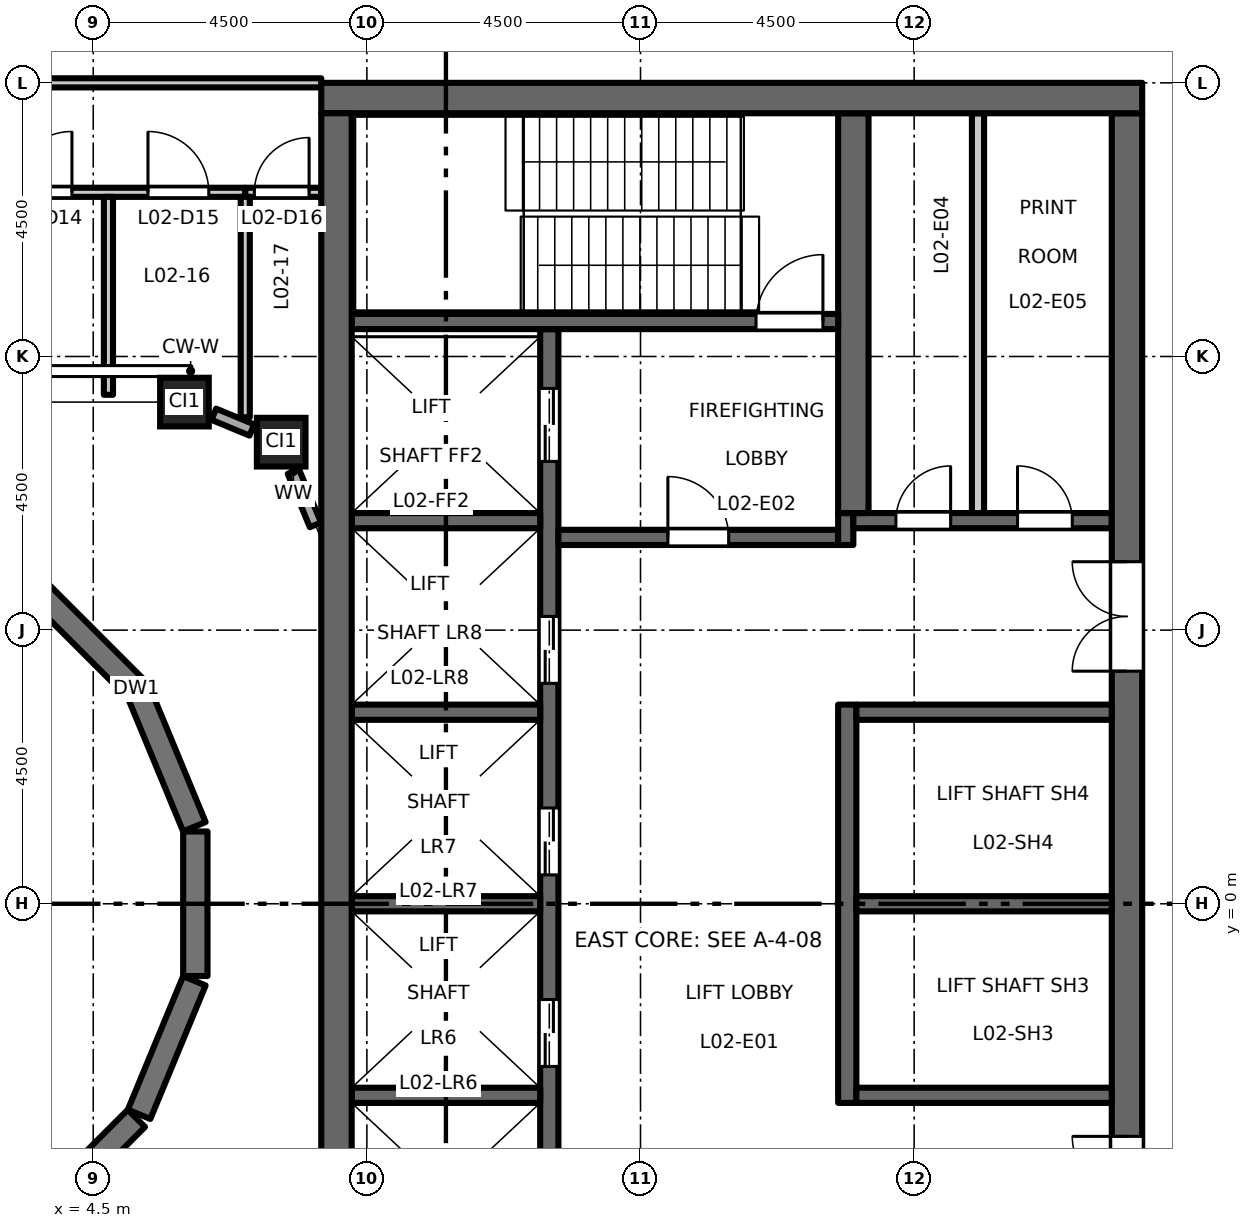
"""IFC4 building model, lengths in metres.
Left out: names, types, materials, properties, quantities, classifications, styles, units other than length and angle.
Written with IfcOpenShell. Run it as: python <this file> out.ifc"""

import sys

from ifc_helpers import new_model, si_unit, direction, frame, frame_2d, origin, origin_2d, place, context, subcontext, project, spatial, rectangle, hollow_rectangle, extrude, element, fill, save


model = new_model("IFC4")
c1 = context("Model", 3, precision=1e-05, world=origin(), true_north=direction((0.0, 1.0)))
c2 = subcontext(c1, "Body", "Model", "MODEL_VIEW")
j1 = project(units=[si_unit("LENGTHUNIT", "METRE"), si_unit("PLANEANGLEUNIT", "RADIAN")], contexts=[c1])
p1 = place(None, origin())
s1 = spatial("IfcSite", under=j1, at=p1, CompositionType="ELEMENT")
p2 = place(p1, origin())
s2 = spatial("IfcBuilding", under=s1, at=p2, CompositionType="ELEMENT")
p3 = place(p2, frame((0.0, 0.0, 12.2)))
s3 = spatial("IfcBuildingStorey", under=s2, at=p3, CompositionType="ELEMENT", Elevation=12.2)
for number, where, z_axis, x_axis in (
    (1, (6.0, 8.25, 0.0), (0.0, 0.0, 1.0), (1.0, 0.0, 0.0)),
    (2, (7.591, 7.591, 0.0), (0.0, 0.0, 1.0), (1.0, 0.0, 0.0)),
):
    element("IfcColumn", number, at=place(p3, frame(where, z_axis=z_axis, x_axis=x_axis)), inside=s3, PredefinedType="COLUMN", context=c2, shape_type="SweptSolid", body=[
        extrude(hollow_rectangle(XDim=0.8, YDim=0.8, WallThickness=0.05, at=origin_2d()), origin(), (0.0, 0.0, 1.0), 5.0),
    ])
p4 = place(p3, frame((12.0, -9.45, 0.0), z_axis=(0.0, 0.0, 1.0), x_axis=(0.0, 1.0, 0.0)))
e3 = element("IfcWall", 3, at=p4, inside=s3, PredefinedType="SHEAR", context=c2, shape_type="SweptSolid", body=[
    extrude(rectangle(XDim=18.9, YDim=0.3, at=frame_2d((9.45, 0.0))), origin(), (0.0, 0.0, 1.0), 4.85),
])
p5 = place(p4, frame((3.625, 0.0, 0.0)))
e4 = element("IfcOpeningElement", 4, at=p5, cuts=e3, PredefinedType="OPENING", context=c2, shape_type="SweptSolid", body=[
    extrude(rectangle(XDim=1.1, YDim=2.1, at=frame_2d((0.55, 1.05))), frame((0.0, 0.16, 0.0), z_axis=(0.0, -1.0, 0.0), x_axis=(1.0, 0.0, 0.0)), (0.0, 0.0, 1.0), 0.32),
])
p6 = place(p4, frame((6.775, 0.0, 0.0)))
e5 = element("IfcOpeningElement", 5, at=p6, cuts=e3, PredefinedType="OPENING", context=c2, shape_type="SweptSolid", body=[
    extrude(rectangle(XDim=1.1, YDim=2.1, at=frame_2d((0.55, 1.05))), frame((0.0, 0.16, 0.0), z_axis=(0.0, -1.0, 0.0), x_axis=(1.0, 0.0, 0.0)), (0.0, 0.0, 1.0), 0.32),
])
p7 = place(p4, frame((9.925, 0.0, 0.0)))
e6 = element("IfcOpeningElement", 6, at=p7, cuts=e3, PredefinedType="OPENING", context=c2, shape_type="SweptSolid", body=[
    extrude(rectangle(XDim=1.1, YDim=2.1, at=frame_2d((0.55, 1.05))), frame((0.0, 0.16, 0.0), z_axis=(0.0, -1.0, 0.0), x_axis=(1.0, 0.0, 0.0)), (0.0, 0.0, 1.0), 0.32),
])
p8 = place(p4, frame((13.075, 0.0, 0.0)))
e7 = element("IfcOpeningElement", 7, at=p8, cuts=e3, PredefinedType="OPENING", context=c2, shape_type="SweptSolid", body=[
    extrude(rectangle(XDim=1.1, YDim=2.1, at=frame_2d((0.55, 1.05))), frame((0.0, 0.16, 0.0), z_axis=(0.0, -1.0, 0.0), x_axis=(1.0, 0.0, 0.0)), (0.0, 0.0, 1.0), 0.32),
])
p9 = place(p4, frame((16.725, 0.0, 0.0)))
e8 = element("IfcOpeningElement", 8, at=p9, cuts=e3, PredefinedType="OPENING", context=c2, shape_type="SweptSolid", body=[
    extrude(rectangle(XDim=1.2, YDim=2.1, at=frame_2d((0.6, 1.05))), frame((0.0, 0.16, 0.0), z_axis=(0.0, -1.0, 0.0), x_axis=(1.0, 0.0, 0.0)), (0.0, 0.0, 1.0), 0.32),
])
p10 = place(p4, frame((0.975, 0.0, 0.0)))
e9 = element("IfcOpeningElement", 9, at=p10, cuts=e3, PredefinedType="OPENING", context=c2, shape_type="SweptSolid", body=[
    extrude(rectangle(XDim=1.2, YDim=2.1, at=frame_2d((0.6, 1.05))), frame((0.0, 0.16, 0.0), z_axis=(0.0, -1.0, 0.0), x_axis=(1.0, 0.0, 0.0)), (0.0, 0.0, 1.0), 0.32),
])
p11 = place(p3, frame((12.15, 6.025, 0.0), z_axis=(0.0, 0.0, 1.0), x_axis=(1.0, 0.0, 0.0)))
e10 = element("IfcWall", 10, at=p11, inside=s3, PredefinedType="SHEAR", context=c2, shape_type="SweptSolid", body=[
    extrude(rectangle(XDim=4.6, YDim=0.25, at=frame_2d((2.3, 0.0))), origin(), (0.0, 0.0, 1.0), 4.85),
])
p12 = place(p11, frame((1.8, 0.0, 0.0)))
e11 = element("IfcOpeningElement", 11, at=p12, cuts=e10, PredefinedType="OPENING", context=c2, shape_type="SweptSolid", body=[
    extrude(rectangle(XDim=1.0, YDim=2.1, at=frame_2d((0.5, 1.05))), frame((0.0, 0.135, 0.0), z_axis=(0.0, -1.0, 0.0), x_axis=(1.0, 0.0, 0.0)), (0.0, 0.0, 1.0), 0.27),
])
p13 = place(p3, frame((16.875, 5.9, 0.0), z_axis=(0.0, 0.0, 1.0), x_axis=(0.0, 1.0, 0.0)))
e12 = element("IfcWall", 12, at=p13, inside=s3, PredefinedType="SHEAR", context=c2, shape_type="SweptSolid", body=[
    extrude(rectangle(XDim=0.525, YDim=0.25, at=frame_2d((0.263, 0.0))), origin(), (0.0, 0.0, 1.0), 4.85),
])
p14 = place(p3, frame((17.0, 6.3, 0.0), z_axis=(0.0, 0.0, 1.0), x_axis=(1.0, 0.0, 0.0)))
e13 = element("IfcWall", 13, at=p14, inside=s3, PredefinedType="SHEAR", context=c2, shape_type="SweptSolid", body=[
    extrude(rectangle(XDim=4.25, YDim=0.25, at=frame_2d((2.125, 0.0))), origin(), (0.0, 0.0, 1.0), 4.85),
])
p15 = place(p14, frame((0.7, 0.0, 0.0)))
e14 = element("IfcOpeningElement", 14, at=p15, cuts=e13, PredefinedType="OPENING", context=c2, shape_type="SweptSolid", body=[
    extrude(rectangle(XDim=0.9, YDim=2.1, at=frame_2d((0.45, 1.05))), frame((0.0, 0.135, 0.0), z_axis=(0.0, -1.0, 0.0), x_axis=(1.0, 0.0, 0.0)), (0.0, 0.0, 1.0), 0.27),
])
p16 = place(p14, frame((2.7, 0.0, 0.0)))
e15 = element("IfcOpeningElement", 15, at=p16, cuts=e13, PredefinedType="OPENING", context=c2, shape_type="SweptSolid", body=[
    extrude(rectangle(XDim=0.9, YDim=2.1, at=frame_2d((0.45, 1.05))), frame((0.0, 0.135, 0.0), z_axis=(0.0, -1.0, 0.0), x_axis=(1.0, 0.0, 0.0)), (0.0, 0.0, 1.0), 0.27),
])
p17 = place(p3, frame((21.5, -13.0, 0.0), z_axis=(0.0, 0.0, 1.0), x_axis=(0.0, 1.0, 0.0)))
e16 = element("IfcWall", 16, at=p17, inside=s3, PredefinedType="SHEAR", context=c2, shape_type="SweptSolid", body=[
    extrude(rectangle(XDim=26.0, YDim=0.5, at=frame_2d((13.0, 0.0))), origin(), (0.0, 0.0, 1.0), 4.85),
])
p18 = place(p17, frame((16.825, 0.0, 0.0)))
e17 = element("IfcOpeningElement", 17, at=p18, cuts=e16, PredefinedType="OPENING", context=c2, shape_type="SweptSolid", body=[
    extrude(rectangle(XDim=1.8, YDim=2.1, at=frame_2d((0.9, 1.05))), frame((0.0, 0.26, 0.0), z_axis=(0.0, -1.0, 0.0), x_axis=(1.0, 0.0, 0.0)), (0.0, 0.0, 1.0), 0.52),
])
p19 = place(p17, frame((7.375, 0.0, 0.0)))
e18 = element("IfcOpeningElement", 18, at=p19, cuts=e16, PredefinedType="OPENING", context=c2, shape_type="SweptSolid", body=[
    extrude(rectangle(XDim=1.8, YDim=2.1, at=frame_2d((0.9, 1.05))), frame((0.0, 0.26, 0.0), z_axis=(0.0, -1.0, 0.0), x_axis=(1.0, 0.0, 0.0)), (0.0, 0.0, 1.0), 0.52),
])
p20 = place(p3, frame((19.05, 6.425, 0.0), z_axis=(0.0, 0.0, 1.0), x_axis=(0.0, 1.0, 0.0)))
e19 = element("IfcWall", 19, at=p20, inside=s3, PredefinedType="PARTITIONING", context=c2, shape_type="SweptSolid", body=[
    extrude(rectangle(XDim=6.575, YDim=0.2, at=frame_2d((3.288, 0.0))), origin(), (0.0, 0.0, 1.0), 4.85),
])
p21 = place(p3, frame((16.9, -3.275, 0.0), z_axis=(0.0, 0.0, 1.0), x_axis=(0.0, 1.0, 0.0)))
e20 = element("IfcWall", 20, at=p21, inside=s3, PredefinedType="SHEAR", context=c2, shape_type="SweptSolid", body=[
    extrude(rectangle(XDim=6.55, YDim=0.3, at=frame_2d((3.275, 0.0))), origin(), (0.0, 0.0, 1.0), 4.85),
])
for number, where, z_axis, x_axis in (
    (21, (17.05, 0.0, 0.0), (0.0, 0.0, 1.0), (1.0, 0.0, 0.0)),
    (22, (17.05, 3.15, 0.0), (0.0, 0.0, 1.0), (1.0, 0.0, 0.0)),
    (23, (17.05, -3.15, 0.0), (0.0, 0.0, 1.0), (1.0, 0.0, 0.0)),
):
    element("IfcWall", number, at=place(p3, frame(where, z_axis=z_axis, x_axis=x_axis)), inside=s3, PredefinedType="SHEAR", context=c2, shape_type="SweptSolid", body=[
        extrude(rectangle(XDim=4.2, YDim=0.25, at=frame_2d((2.1, 0.0))), origin(), (0.0, 0.0, 1.0), 4.85),
    ])
p22 = place(p3, frame((17.0, 6.425, 0.0), z_axis=(0.0, 0.0, 1.0), x_axis=(0.0, 1.0, 0.0)))
e24 = element("IfcWall", 24, at=p22, inside=s3, PredefinedType="SHEAR", context=c2, shape_type="SweptSolid", body=[
    extrude(rectangle(XDim=6.575, YDim=0.5, at=frame_2d((3.288, 0.0))), origin(), (0.0, 0.0, 1.0), 4.85),
])
for number, where, z_axis, x_axis in (
    (25, (8.75, 0.0, 0.0), (0.0, 0.0, 1.0), (1.0, 0.0, 0.0)),
    (26, (8.75, 3.15, 0.0), (0.0, 0.0, 1.0), (1.0, 0.0, 0.0)),
    (27, (8.75, 6.3, 0.0), (0.0, 0.0, 1.0), (1.0, 0.0, 0.0)),
    (28, (8.75, -3.15, 0.0), (0.0, 0.0, 1.0), (1.0, 0.0, 0.0)),
):
    element("IfcWall", number, at=place(p3, frame(where, z_axis=z_axis, x_axis=x_axis)), inside=s3, PredefinedType="SHEAR", context=c2, shape_type="SweptSolid", body=[
        extrude(rectangle(XDim=3.1, YDim=0.25, at=frame_2d((1.55, 0.0))), origin(), (0.0, 0.0, 1.0), 4.85),
    ])
p23 = place(p3, frame((8.75, 9.575, 0.0), z_axis=(0.0, 0.0, 1.0), x_axis=(1.0, 0.0, 0.0)))
e29 = element("IfcWall", 29, at=p23, inside=s3, PredefinedType="SHEAR", context=c2, shape_type="SweptSolid", body=[
    extrude(rectangle(XDim=8.0, YDim=0.25, at=frame_2d((4.0, 0.0))), origin(), (0.0, 0.0, 1.0), 4.85),
])
p24 = place(p23, frame((6.65, 0.0, 0.0)))
e30 = element("IfcOpeningElement", 30, at=p24, cuts=e29, PredefinedType="OPENING", context=c2, shape_type="SweptSolid", body=[
    extrude(rectangle(XDim=1.1, YDim=2.1, at=frame_2d((0.55, 1.05))), frame((0.0, 0.135, 0.0), z_axis=(0.0, -1.0, 0.0), x_axis=(1.0, 0.0, 0.0)), (0.0, 0.0, 1.0), 0.27),
])
p25 = place(p3, frame((8.25, 13.25, 0.0), z_axis=(0.0, 0.0, 1.0), x_axis=(1.0, 0.0, 0.0)))
e31 = element("IfcWall", 31, at=p25, inside=s3, PredefinedType="SHEAR", context=c2, shape_type="SweptSolid", body=[
    extrude(rectangle(XDim=13.5, YDim=0.5, at=frame_2d((6.75, 0.0))), origin(), (0.0, 0.0, 1.0), 4.85),
])
p26 = place(p3, frame((8.5, -13.0, 0.0), z_axis=(0.0, 0.0, 1.0), x_axis=(0.0, 1.0, 0.0)))
e32 = element("IfcWall", 32, at=p26, inside=s3, PredefinedType="SHEAR", context=c2, shape_type="SweptSolid", body=[
    extrude(rectangle(XDim=26.0, YDim=0.5, at=frame_2d((13.0, 0.0))), origin(), (0.0, 0.0, 1.0), 4.85),
])
p27 = place(p3, frame((8.154, 6.231, 0.0), z_axis=(0.0, 0.0, 1.0), x_axis=(-0.382624318388, 0.923904016107, 0.0)))
e33 = element("IfcWall", 33, at=p27, inside=s3, PredefinedType="STANDARD", context=c2, shape_type="SweptSolid", body=[
    extrude(rectangle(XDim=0.949, YDim=0.2, at=frame_2d((0.475, 0.0))), origin(), (0.0, 0.0, 1.0), 4.23),
])
p28 = place(p3, frame((7.108, 7.791, 0.0), z_axis=(0.0, 0.0, 1.0), x_axis=(-0.923854141361, 0.382744726273, 0.0)))
e34 = element("IfcWall", 34, at=p28, inside=s3, PredefinedType="STANDARD", context=c2, shape_type="SweptSolid", body=[
    extrude(rectangle(XDim=0.677, YDim=0.2, at=frame_2d((0.338, 0.0))), origin(), (0.0, 0.0, 1.0), 4.23),
])
p29 = place(p3, frame((6.163, 1.267, 0.0), z_axis=(0.0, 0.0, 1.0), x_axis=(-0.382681453552, 0.92388035216, 0.0)))
e35 = element("IfcWall", 35, at=p29, inside=s3, PredefinedType="SOLIDWALL", context=c2, shape_type="SweptSolid", body=[
    extrude(rectangle(XDim=2.376, YDim=0.4, at=frame_2d((1.188, 0.0))), origin(), (0.0, 0.0, 1.0), 4.7),
])
for number, where, z_axis, x_axis in (
    (36, (5.209, 3.529, 0.0), (0.0, 0.0, 1.0), (-0.707, 0.707, 0.0)),
    (37, (3.529, -5.209, 0.0), (0.0, 0.0, 1.0), (0.707, 0.707, 0.0)),
):
    element("IfcWall", number, at=place(p3, frame(where, z_axis=z_axis, x_axis=x_axis)), inside=s3, PredefinedType="SOLIDWALL", context=c2, shape_type="SweptSolid", body=[
        extrude(rectangle(XDim=2.377, YDim=0.4, at=frame_2d((1.188, 0.0))), origin(), (0.0, 0.0, 1.0), 4.7),
    ])
for number, where, z_axis, x_axis in (
    (38, (5.254, -3.462, 0.0), (0.0, 0.0, 1.0), (0.383, 0.924, 0.0)),
    (39, (6.179, -1.188, 0.0), (0.0, 0.0, 1.0), (0.0, 1.0, 0.0)),
):
    element("IfcWall", number, at=place(p3, frame(where, z_axis=z_axis, x_axis=x_axis)), inside=s3, PredefinedType="SOLIDWALL", context=c2, shape_type="SweptSolid", body=[
        extrude(rectangle(XDim=2.376, YDim=0.4, at=frame_2d((1.188, 0.0))), origin(), (0.0, 0.0, 1.0), 4.7),
    ])
p30 = place(p3, frame((-8.25, 11.7, 0.0), z_axis=(0.0, 0.0, 1.0), x_axis=(1.0, 0.0, 0.0)))
e40 = element("IfcWall", 40, at=p30, inside=s3, PredefinedType="PARTITIONING", context=c2, shape_type="SweptSolid", body=[
    extrude(rectangle(XDim=15.25, YDim=0.15, at=frame_2d((7.625, 0.0))), origin(), (0.0, 0.0, 1.0), 4.85),
])
p31 = place(p30, frame((0.65, 0.0, 0.0)))
e41 = element("IfcOpeningElement", 41, at=p31, cuts=e40, PredefinedType="OPENING", context=c2, shape_type="SweptSolid", body=[
    extrude(rectangle(XDim=1.0, YDim=2.1, at=frame_2d((0.5, 1.05))), frame((0.0, 0.085, 0.0), z_axis=(0.0, -1.0, 0.0), x_axis=(1.0, 0.0, 0.0)), (0.0, 0.0, 1.0), 0.17),
])
p32 = place(p30, frame((11.4, 0.0, 0.0)))
e42 = element("IfcOpeningElement", 42, at=p32, cuts=e40, PredefinedType="OPENING", context=c2, shape_type="SweptSolid", body=[
    extrude(rectangle(XDim=1.0, YDim=2.1, at=frame_2d((0.5, 1.05))), frame((0.0, 0.085, 0.0), z_axis=(0.0, -1.0, 0.0), x_axis=(1.0, 0.0, 0.0)), (0.0, 0.0, 1.0), 0.17),
])
p33 = place(p30, frame((13.65, 0.0, 0.0)))
e43 = element("IfcOpeningElement", 43, at=p33, cuts=e40, PredefinedType="OPENING", context=c2, shape_type="SweptSolid", body=[
    extrude(rectangle(XDim=1.0, YDim=2.1, at=frame_2d((0.5, 1.05))), frame((0.0, 0.085, 0.0), z_axis=(0.0, -1.0, 0.0), x_axis=(1.0, 0.0, 0.0)), (0.0, 0.0, 1.0), 0.17),
])
p34 = place(p3, frame((7.0, 11.7, 0.0), z_axis=(0.0, 0.0, 1.0), x_axis=(1.0, 0.0, 0.0)))
e44 = element("IfcWall", 44, at=p34, inside=s3, PredefinedType="PARTITIONING", context=c2, shape_type="SweptSolid", body=[
    extrude(rectangle(XDim=1.25, YDim=0.15, at=frame_2d((0.625, 0.0))), origin(), (0.0, 0.0, 1.0), 4.85),
])
p35 = place(p34, frame((0.15, 0.0, 0.0)))
e45 = element("IfcOpeningElement", 45, at=p35, cuts=e44, PredefinedType="OPENING", context=c2, shape_type="SweptSolid", body=[
    extrude(rectangle(XDim=0.9, YDim=2.1, at=frame_2d((0.45, 1.05))), frame((0.0, 0.085, 0.0), z_axis=(0.0, -1.0, 0.0), x_axis=(1.0, 0.0, 0.0)), (0.0, 0.0, 1.0), 0.17),
])
p36 = place(p3, frame((-8.25, 13.5, 0.0), z_axis=(0.0, 0.0, 1.0), x_axis=(1.0, 0.0, 0.0)))
e46 = element("IfcWall", 46, at=p36, inside=s3, PredefinedType="PARTITIONING", context=c2, shape_type="SweptSolid", body=[
    extrude(rectangle(XDim=16.5, YDim=0.15, at=frame_2d((8.25, 0.0))), origin(), (0.0, 0.0, 1.0), 4.35),
])
p37 = place(p36, frame((6.65, 0.0, 0.0)))
e47 = element("IfcOpeningElement", 47, at=p37, cuts=e46, PredefinedType="OPENING", context=c2, shape_type="SweptSolid", body=[
    extrude(rectangle(XDim=1.0, YDim=2.1, at=frame_2d((0.5, 1.05))), frame((0.0, 0.085, 0.0), z_axis=(0.0, -1.0, 0.0), x_axis=(1.0, 0.0, 0.0)), (0.0, 0.0, 1.0), 0.17),
])
p38 = place(p3, frame((4.75, 8.37, 0.0), z_axis=(0.0, 0.0, 1.0), x_axis=(0.0, 1.0, 0.0)))
e48 = element("IfcWall", 48, at=p38, inside=s3, PredefinedType="PARTITIONING", context=c2, shape_type="SweptSolid", body=[
    extrude(rectangle(XDim=3.255, YDim=0.15, at=frame_2d((1.627, 0.0))), origin(), (0.0, 0.0, 1.0), 4.85),
])
p39 = place(p3, frame((7.0, 8.0, 0.0), z_axis=(0.0, 0.0, 1.0), x_axis=(0.0, 1.0, 0.0)))
e49 = element("IfcWall", 49, at=p39, inside=s3, PredefinedType="PARTITIONING", context=c2, shape_type="SweptSolid", body=[
    extrude(rectangle(XDim=3.625, YDim=0.15, at=frame_2d((1.812, 0.0))), origin(), (0.0, 0.0, 1.0), 4.85),
])
p40 = place(p12, origin())
e50 = element("IfcDoor", 50, at=p40, inside=s3, OperationType="SINGLE_SWING_RIGHT", PredefinedType="DOOR", context=c2, shape_type="SweptSolid", body=[
    extrude(rectangle(XDim=1.0, YDim=2.1, at=frame_2d((0.5, 1.05))), frame((0.0, 0.025, 0.0), z_axis=(0.0, -1.0, 0.0), x_axis=(1.0, 0.0, 0.0)), (0.0, 0.0, 1.0), 0.05),
])
fill(e11, e50)
p41 = place(p24, origin())
e51 = element("IfcDoor", 51, at=p41, inside=s3, OperationType="SINGLE_SWING_LEFT", PredefinedType="DOOR", context=c2, shape_type="SweptSolid", body=[
    extrude(rectangle(XDim=1.1, YDim=2.1, at=frame_2d((0.55, 1.05))), frame((0.0, 0.025, 0.0), z_axis=(0.0, -1.0, 0.0), x_axis=(1.0, 0.0, 0.0)), (0.0, 0.0, 1.0), 0.05),
])
fill(e30, e51)
p42 = place(p18, origin())
e52 = element("IfcDoor", 52, at=p42, inside=s3, OperationType="DOUBLE_DOOR_DOUBLE_SWING", PredefinedType="DOOR", context=c2, shape_type="SweptSolid", body=[
    extrude(rectangle(XDim=1.8, YDim=2.1, at=frame_2d((0.9, 1.05))), frame((0.0, 0.025, 0.0), z_axis=(0.0, -1.0, 0.0), x_axis=(1.0, 0.0, 0.0)), (0.0, 0.0, 1.0), 0.05),
])
fill(e17, e52)
p43 = place(p19, origin())
e53 = element("IfcDoor", 53, at=p43, inside=s3, OperationType="DOUBLE_DOOR_DOUBLE_SWING", PredefinedType="DOOR", context=c2, shape_type="SweptSolid", body=[
    extrude(rectangle(XDim=1.8, YDim=2.1, at=frame_2d((0.9, 1.05))), frame((0.0, 0.025, 0.0), z_axis=(0.0, -1.0, 0.0), x_axis=(1.0, 0.0, 0.0)), (0.0, 0.0, 1.0), 0.05),
])
fill(e18, e53)
p44 = place(p6, origin())
e54 = element("IfcDoor", 54, at=p44, inside=s3, OperationType="DOUBLE_DOOR_SLIDING", PredefinedType="DOOR", context=c2, shape_type="SweptSolid", body=[
    extrude(rectangle(XDim=1.1, YDim=2.1, at=frame_2d((0.55, 1.05))), frame((0.0, 0.025, 0.0), z_axis=(0.0, -1.0, 0.0), x_axis=(1.0, 0.0, 0.0)), (0.0, 0.0, 1.0), 0.05),
])
fill(e5, e54)
p45 = place(p7, origin())
e55 = element("IfcDoor", 55, at=p45, inside=s3, OperationType="DOUBLE_DOOR_SLIDING", PredefinedType="DOOR", context=c2, shape_type="SweptSolid", body=[
    extrude(rectangle(XDim=1.1, YDim=2.1, at=frame_2d((0.55, 1.05))), frame((0.0, 0.025, 0.0), z_axis=(0.0, -1.0, 0.0), x_axis=(1.0, 0.0, 0.0)), (0.0, 0.0, 1.0), 0.05),
])
fill(e6, e55)
p46 = place(p8, origin())
e56 = element("IfcDoor", 56, at=p46, inside=s3, OperationType="DOUBLE_DOOR_SLIDING", PredefinedType="DOOR", context=c2, shape_type="SweptSolid", body=[
    extrude(rectangle(XDim=1.1, YDim=2.1, at=frame_2d((0.55, 1.05))), frame((0.0, 0.025, 0.0), z_axis=(0.0, -1.0, 0.0), x_axis=(1.0, 0.0, 0.0)), (0.0, 0.0, 1.0), 0.05),
])
fill(e7, e56)
p47 = place(p9, origin())
e57 = element("IfcDoor", 57, at=p47, inside=s3, OperationType="DOUBLE_DOOR_SLIDING", PredefinedType="DOOR", context=c2, shape_type="SweptSolid", body=[
    extrude(rectangle(XDim=1.2, YDim=2.1, at=frame_2d((0.6, 1.05))), frame((0.0, 0.025, 0.0), z_axis=(0.0, -1.0, 0.0), x_axis=(1.0, 0.0, 0.0)), (0.0, 0.0, 1.0), 0.05),
])
fill(e8, e57)
p48 = place(p15, origin())
e58 = element("IfcDoor", 58, at=p48, inside=s3, OperationType="SINGLE_SWING_LEFT", PredefinedType="DOOR", context=c2, shape_type="SweptSolid", body=[
    extrude(rectangle(XDim=0.9, YDim=2.1, at=frame_2d((0.45, 1.05))), frame((0.0, 0.025, 0.0), z_axis=(0.0, -1.0, 0.0), x_axis=(1.0, 0.0, 0.0)), (0.0, 0.0, 1.0), 0.05),
])
fill(e14, e58)
p49 = place(p16, origin())
e59 = element("IfcDoor", 59, at=p49, inside=s3, OperationType="SINGLE_SWING_RIGHT", PredefinedType="DOOR", context=c2, shape_type="SweptSolid", body=[
    extrude(rectangle(XDim=0.9, YDim=2.1, at=frame_2d((0.45, 1.05))), frame((0.0, 0.025, 0.0), z_axis=(0.0, -1.0, 0.0), x_axis=(1.0, 0.0, 0.0)), (0.0, 0.0, 1.0), 0.05),
])
fill(e15, e59)
p50 = place(p32, origin())
e60 = element("IfcDoor", 60, at=p50, inside=s3, OperationType="SINGLE_SWING_RIGHT", PredefinedType="DOOR", context=c2, shape_type="SweptSolid", body=[
    extrude(rectangle(XDim=1.0, YDim=2.1, at=frame_2d((0.5, 1.05))), frame((0.0, 0.025, 0.0), z_axis=(0.0, -1.0, 0.0), x_axis=(1.0, 0.0, 0.0)), (0.0, 0.0, 1.0), 0.05),
])
fill(e42, e60)
p51 = place(p33, origin())
e61 = element("IfcDoor", 61, at=p51, inside=s3, OperationType="SINGLE_SWING_LEFT", PredefinedType="DOOR", context=c2, shape_type="SweptSolid", body=[
    extrude(rectangle(XDim=1.0, YDim=2.1, at=frame_2d((0.5, 1.05))), frame((0.0, 0.025, 0.0), z_axis=(0.0, -1.0, 0.0), x_axis=(1.0, 0.0, 0.0)), (0.0, 0.0, 1.0), 0.05),
])
fill(e43, e61)
p52 = place(p35, origin())
e62 = element("IfcDoor", 62, at=p52, inside=s3, OperationType="SINGLE_SWING_RIGHT", PredefinedType="DOOR", context=c2, shape_type="SweptSolid", body=[
    extrude(rectangle(XDim=0.9, YDim=2.1, at=frame_2d((0.45, 1.05))), frame((0.0, 0.025, 0.0), z_axis=(0.0, -1.0, 0.0), x_axis=(1.0, 0.0, 0.0)), (0.0, 0.0, 1.0), 0.05),
])
fill(e45, e62)
save(model, sys.argv[1])
